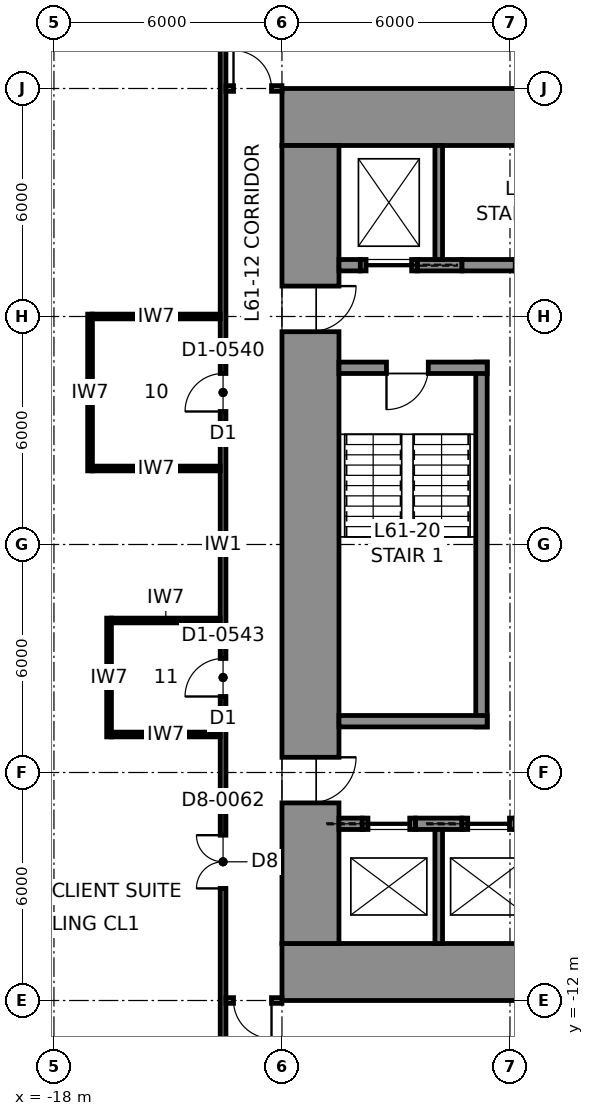
"""IFC4 building model, lengths in metres.
Left out: names, types, materials, properties, quantities, classifications, styles, units other than length and angle.
Written with IfcOpenShell. Run it as: python <this file> out.ifc"""

import sys

from ifc_helpers import new_model, si_unit, direction, frame, frame_2d, origin, place, context, subcontext, project, spatial, rectangle, extrude, element, fill, save


model = new_model("IFC4")
c1 = context("Model", 3, precision=1e-05, world=origin(), true_north=direction((0.0, 1.0)))
c2 = subcontext(c1, "Body", "Model", "MODEL_VIEW")
j1 = project(units=[si_unit("LENGTHUNIT", "METRE"), si_unit("PLANEANGLEUNIT", "RADIAN")], contexts=[c1])
p1 = place(None, origin())
s1 = spatial("IfcSite", under=j1, at=p1, CompositionType="ELEMENT")
p2 = place(p1, origin())
s2 = spatial("IfcBuilding", under=s1, at=p2, CompositionType="ELEMENT")
p3 = place(p2, frame((0.0, 0.0, 273.8)))
s3 = spatial("IfcBuildingStorey", under=s2, at=p3, CompositionType="ELEMENT", Elevation=273.8)
for number, where, z_axis, x_axis in (
    (1, (-12.0, 11.25, 0.0), (0.0, 0.0, 1.0), (1.0, 0.0, 0.0)),
    (2, (12.0, -11.25, 0.0), (0.0, 0.0, 1.0), (-1.0, 0.0, 0.0)),
):
    element("IfcWall", number, at=place(p3, frame(where, z_axis=z_axis, x_axis=x_axis)), inside=s3, PredefinedType="SHEAR", context=c2, shape_type="SweptSolid", body=[
        extrude(rectangle(XDim=24.0, YDim=1.5, at=frame_2d((12.0, 0.0))), origin(), (0.0, 0.0, 1.0), 4.0),
    ])
p4 = place(p3, frame((-11.25, -10.5, 0.0), z_axis=(0.0, 0.0, 1.0), x_axis=(0.0, 1.0, 0.0)))
e3 = element("IfcWall", 3, at=p4, inside=s3, PredefinedType="SHEAR", context=c2, shape_type="SweptSolid", body=[
    extrude(rectangle(XDim=21.0, YDim=1.5, at=frame_2d((10.5, 0.0))), origin(), (0.0, 0.0, 1.0), 4.0),
])
p5 = place(p4, frame((16.1, 0.0, 0.0)))
e4 = element("IfcOpeningElement", 4, at=p5, cuts=e3, PredefinedType="OPENING", context=c2, shape_type="SweptSolid", body=[
    extrude(rectangle(XDim=1.2, YDim=2.3, at=frame_2d((0.6, 1.15))), frame((0.0, 0.76, 0.0), z_axis=(0.0, -1.0, 0.0), x_axis=(1.0, 0.0, 0.0)), (0.0, 0.0, 1.0), 1.52),
])
p6 = place(p4, frame((3.7, 0.0, 0.0)))
e5 = element("IfcOpeningElement", 5, at=p6, cuts=e3, PredefinedType="OPENING", context=c2, shape_type="SweptSolid", body=[
    extrude(rectangle(XDim=1.2, YDim=2.3, at=frame_2d((0.6, 1.15))), frame((0.0, 0.76, 0.0), z_axis=(0.0, -1.0, 0.0), x_axis=(1.0, 0.0, 0.0)), (0.0, 0.0, 1.0), 1.52),
])
p7 = place(p3, frame((-10.5, 7.35, 0.0), z_axis=(0.0, 0.0, 1.0), x_axis=(1.0, 0.0, 0.0)))
e6 = element("IfcWall", 6, at=p7, inside=s3, PredefinedType="SHEAR", context=c2, shape_type="SweptSolid", body=[
    extrude(rectangle(XDim=0.562, YDim=0.3, at=frame_2d((0.281, 0.0))), origin(), (0.0, 0.0, 1.0), 4.0),
])
p8 = place(p3, frame((-8.438, 7.35, 0.0), z_axis=(0.0, 0.0, 1.0), x_axis=(1.0, 0.0, 0.0)))
e7 = element("IfcWall", 7, at=p8, inside=s3, PredefinedType="SHEAR", context=c2, shape_type="SweptSolid", body=[
    extrude(rectangle(XDim=1.175, YDim=0.3, at=frame_2d((0.587, 0.0))), origin(), (0.0, 0.0, 1.0), 4.0),
])
p9 = place(p3, frame((-9.938, 7.35, 0.0), z_axis=(0.0, 0.0, 1.0), x_axis=(1.0, 0.0, 0.0)))
e8 = element("IfcWall", 8, at=p9, inside=s3, PredefinedType="PARTITIONING", context=c2, shape_type="SweptSolid", body=[
    extrude(rectangle(XDim=1.5, YDim=0.3, at=frame_2d((0.75, 0.0))), origin(), (0.0, 0.0, 1.0), 4.0),
])
p10 = place(p9, frame((0.15, 0.0, 0.0)))
e9 = element("IfcOpeningElement", 9, at=p10, cuts=e8, PredefinedType="OPENING", context=c2, shape_type="SweptSolid", body=[
    extrude(rectangle(XDim=1.2, YDim=2.3, at=frame_2d((0.6, 1.15))), frame((0.0, 0.16, 0.0), z_axis=(0.0, -1.0, 0.0), x_axis=(1.0, 0.0, 0.0)), (0.0, 0.0, 1.0), 0.32),
])
p11 = place(p3, frame((-7.262, 7.35, 0.0), z_axis=(0.0, 0.0, 1.0), x_axis=(1.0, 0.0, 0.0)))
e10 = element("IfcWall", 10, at=p11, inside=s3, PredefinedType="PARTITIONING", context=c2, shape_type="SweptSolid", body=[
    extrude(rectangle(XDim=1.4, YDim=0.3, at=frame_2d((0.7, 0.0))), origin(), (0.0, 0.0, 1.0), 4.0),
])
p12 = place(p3, frame((-7.875, 7.5, 0.0), z_axis=(0.0, 0.0, 1.0), x_axis=(0.0, 1.0, 0.0)))
e11 = element("IfcWall", 11, at=p12, inside=s3, PredefinedType="PARTITIONING", context=c2, shape_type="SweptSolid", body=[
    extrude(rectangle(XDim=3.0, YDim=0.2, at=frame_2d((1.5, 0.0))), origin(), (0.0, 0.0, 1.0), 4.0),
])
p13 = place(p3, frame((-10.5, -7.35, 0.0), z_axis=(0.0, 0.0, 1.0), x_axis=(1.0, 0.0, 0.0)))
e12 = element("IfcWall", 12, at=p13, inside=s3, PredefinedType="SHEAR", context=c2, shape_type="SweptSolid", body=[
    extrude(rectangle(XDim=0.613, YDim=0.3, at=frame_2d((0.306, 0.0))), origin(), (0.0, 0.0, 1.0), 4.0),
])
p14 = place(p3, frame((-8.488, -7.35, 0.0), z_axis=(0.0, 0.0, 1.0), x_axis=(1.0, 0.0, 0.0)))
e13 = element("IfcWall", 13, at=p14, inside=s3, PredefinedType="SHEAR", context=c2, shape_type="SweptSolid", body=[
    extrude(rectangle(XDim=1.225, YDim=0.3, at=frame_2d((0.613, 0.0))), origin(), (0.0, 0.0, 1.0), 4.0),
])
p15 = place(p3, frame((-9.887, -7.35, 0.0), z_axis=(0.0, 0.0, 1.0), x_axis=(1.0, 0.0, 0.0)))
e14 = element("IfcWall", 14, at=p15, inside=s3, PredefinedType="PARTITIONING", context=c2, shape_type="SweptSolid", body=[
    extrude(rectangle(XDim=1.4, YDim=0.3, at=frame_2d((0.7, 0.0))), origin(), (0.0, 0.0, 1.0), 4.0),
])
p16 = place(p15, frame((0.15, 0.0, 0.0)))
e15 = element("IfcOpeningElement", 15, at=p16, cuts=e14, PredefinedType="OPENING", context=c2, shape_type="SweptSolid", body=[
    extrude(rectangle(XDim=1.1, YDim=2.3, at=frame_2d((0.55, 1.15))), frame((0.0, 0.16, 0.0), z_axis=(0.0, -1.0, 0.0), x_axis=(1.0, 0.0, 0.0)), (0.0, 0.0, 1.0), 0.32),
])
p17 = place(p3, frame((-7.262, -7.35, 0.0), z_axis=(0.0, 0.0, 1.0), x_axis=(1.0, 0.0, 0.0)))
e16 = element("IfcWall", 16, at=p17, inside=s3, PredefinedType="PARTITIONING", context=c2, shape_type="SweptSolid", body=[
    extrude(rectangle(XDim=1.4, YDim=0.3, at=frame_2d((0.7, 0.0))), origin(), (0.0, 0.0, 1.0), 4.0),
])
p18 = place(p17, frame((0.15, 0.0, 0.0)))
e17 = element("IfcOpeningElement", 17, at=p18, cuts=e16, PredefinedType="OPENING", context=c2, shape_type="SweptSolid", body=[
    extrude(rectangle(XDim=1.1, YDim=2.3, at=frame_2d((0.55, 1.15))), frame((0.0, 0.16, 0.0), z_axis=(0.0, -1.0, 0.0), x_axis=(1.0, 0.0, 0.0)), (0.0, 0.0, 1.0), 0.32),
])
p19 = place(p3, frame((-7.875, -10.5, 0.0), z_axis=(0.0, 0.0, 1.0), x_axis=(0.0, 1.0, 0.0)))
e18 = element("IfcWall", 18, at=p19, inside=s3, PredefinedType="PARTITIONING", context=c2, shape_type="SweptSolid", body=[
    extrude(rectangle(XDim=3.0, YDim=0.2, at=frame_2d((1.5, 0.0))), origin(), (0.0, 0.0, 1.0), 4.0),
])
p20 = place(p3, frame((-13.55, 13.575, 0.0), z_axis=(0.0, 0.0, 1.0), x_axis=(0.0, -1.0, 0.0)))
e19 = element("IfcWall", 19, at=p20, inside=s3, PredefinedType="PARTITIONING", context=c2, shape_type="SweptSolid", body=[
    extrude(rectangle(XDim=27.15, YDim=0.15, at=frame_2d((13.575, 0.0))), origin(), (0.0, 0.0, 1.0), 3.83),
])
p21 = place(p20, frame((21.225, 0.0, 0.0)))
e20 = element("IfcOpeningElement", 20, at=p21, cuts=e19, PredefinedType="OPENING", context=c2, shape_type="SweptSolid", body=[
    extrude(rectangle(XDim=1.4, YDim=2.3, at=frame_2d((0.7, 1.15))), frame((0.0, 0.085, 0.0), z_axis=(0.0, -1.0, 0.0), x_axis=(1.0, 0.0, 0.0)), (0.0, 0.0, 1.0), 0.17),
])
p22 = place(p20, frame((9.075, 0.0, 0.0)))
e21 = element("IfcOpeningElement", 21, at=p22, cuts=e19, PredefinedType="OPENING", context=c2, shape_type="SweptSolid", body=[
    extrude(rectangle(XDim=1.0, YDim=2.3, at=frame_2d((0.5, 1.15))), frame((0.0, 0.085, 0.0), z_axis=(0.0, -1.0, 0.0), x_axis=(1.0, 0.0, 0.0)), (0.0, 0.0, 1.0), 0.17),
])
p23 = place(p20, frame((16.575, 0.0, 0.0)))
e22 = element("IfcOpeningElement", 22, at=p23, cuts=e19, PredefinedType="OPENING", context=c2, shape_type="SweptSolid", body=[
    extrude(rectangle(XDim=1.0, YDim=2.3, at=frame_2d((0.5, 1.15))), frame((0.0, 0.085, 0.0), z_axis=(0.0, -1.0, 0.0), x_axis=(1.0, 0.0, 0.0)), (0.0, 0.0, 1.0), 0.17),
])
p24 = place(p3, frame((-13.475, 12.0, 0.0), z_axis=(0.0, 0.0, 1.0), x_axis=(1.0, 0.0, 0.0)))
e23 = element("IfcWall", 23, at=p24, inside=s3, PredefinedType="PARTITIONING", context=c2, shape_type="SweptSolid", body=[
    extrude(rectangle(XDim=1.475, YDim=0.15, at=frame_2d((0.738, 0.0))), origin(), (0.0, 0.0, 1.0), 3.83),
])
p25 = place(p24, frame((0.2, 0.0, 0.0)))
e24 = element("IfcOpeningElement", 24, at=p25, cuts=e23, PredefinedType="OPENING", context=c2, shape_type="SweptSolid", body=[
    extrude(rectangle(XDim=1.0, YDim=2.3, at=frame_2d((0.5, 1.15))), frame((0.0, 0.085, 0.0), z_axis=(0.0, -1.0, 0.0), x_axis=(1.0, 0.0, 0.0)), (0.0, 0.0, 1.0), 0.17),
])
p26 = place(p3, frame((-12.0, -12.0, 0.0), z_axis=(0.0, 0.0, 1.0), x_axis=(-1.0, 0.0, 0.0)))
e25 = element("IfcWall", 25, at=p26, inside=s3, PredefinedType="PARTITIONING", context=c2, shape_type="SweptSolid", body=[
    extrude(rectangle(XDim=1.475, YDim=0.15, at=frame_2d((0.738, 0.0))), origin(), (0.0, 0.0, 1.0), 3.83),
])
p27 = place(p26, frame((0.275, 0.0, 0.0)))
e26 = element("IfcOpeningElement", 26, at=p27, cuts=e25, PredefinedType="OPENING", context=c2, shape_type="SweptSolid", body=[
    extrude(rectangle(XDim=1.0, YDim=2.3, at=frame_2d((0.5, 1.15))), frame((0.0, 0.085, 0.0), z_axis=(0.0, -1.0, 0.0), x_axis=(1.0, 0.0, 0.0)), (0.0, 0.0, 1.0), 0.17),
])
p28 = place(p3, frame((-17.05, 1.938, 0.0), z_axis=(0.0, 0.0, 1.0), x_axis=(0.0, 1.0, 0.0)))
e27 = element("IfcWall", 27, at=p28, inside=s3, PredefinedType="PARTITIONING", context=c2, shape_type="SweptSolid", body=[
    extrude(rectangle(XDim=4.125, YDim=0.125, at=frame_2d((2.062, 0.0))), origin(), (0.0, 0.0, 1.0), 3.83),
])
for number, where, z_axis, x_axis in (
    (28, (-13.625, 2.0, 0.0), (0.0, 0.0, 1.0), (-1.0, 0.0, 0.0)),
    (29, (-13.625, 6.0, 0.0), (0.0, 0.0, 1.0), (-1.0, 0.0, 0.0)),
):
    element("IfcWall", number, at=place(p3, frame(where, z_axis=z_axis, x_axis=x_axis)), inside=s3, PredefinedType="PARTITIONING", context=c2, shape_type="SweptSolid", body=[
        extrude(rectangle(XDim=3.363, YDim=0.125, at=frame_2d((1.681, 0.0))), origin(), (0.0, 0.0, 1.0), 3.83),
    ])
p29 = place(p3, frame((-16.55, -5.062, 0.0), z_axis=(0.0, 0.0, 1.0), x_axis=(0.0, 1.0, 0.0)))
e30 = element("IfcWall", 30, at=p29, inside=s3, PredefinedType="PARTITIONING", context=c2, shape_type="SweptSolid", body=[
    extrude(rectangle(XDim=3.125, YDim=0.125, at=frame_2d((1.562, 0.0))), origin(), (0.0, 0.0, 1.0), 3.83),
])
for number, where, z_axis, x_axis in (
    (31, (-13.625, -5.0, 0.0), (0.0, 0.0, 1.0), (-1.0, 0.0, 0.0)),
    (32, (-13.625, -2.0, 0.0), (0.0, 0.0, 1.0), (-1.0, 0.0, 0.0)),
):
    element("IfcWall", number, at=place(p3, frame(where, z_axis=z_axis, x_axis=x_axis)), inside=s3, PredefinedType="PARTITIONING", context=c2, shape_type="SweptSolid", body=[
        extrude(rectangle(XDim=2.863, YDim=0.125, at=frame_2d((1.431, 0.0))), origin(), (0.0, 0.0, 1.0), 3.83),
    ])
p30 = place(p3, frame((-6.75, -4.8, 0.0), z_axis=(0.0, 0.0, 1.0), x_axis=(0.0, 1.0, 0.0)))
e33 = element("IfcWall", 33, at=p30, inside=s3, PredefinedType="SOLIDWALL", context=c2, shape_type="SweptSolid", body=[
    extrude(rectangle(XDim=9.6, YDim=0.3, at=frame_2d((4.8, 0.0))), origin(), (0.0, 0.0, 1.0), 3.75),
])
p31 = place(p3, frame((-10.5, 4.65, 0.0), z_axis=(0.0, 0.0, 1.0), x_axis=(1.0, 0.0, 0.0)))
e34 = element("IfcWall", 34, at=p31, inside=s3, PredefinedType="SOLIDWALL", context=c2, shape_type="SweptSolid", body=[
    extrude(rectangle(XDim=3.9, YDim=0.3, at=frame_2d((1.95, 0.0))), origin(), (0.0, 0.0, 1.0), 3.75),
])
p32 = place(p31, frame((1.25, 0.0, 0.0)))
e35 = element("IfcOpeningElement", 35, at=p32, cuts=e34, PredefinedType="OPENING", context=c2, shape_type="SweptSolid", body=[
    extrude(rectangle(XDim=1.1, YDim=2.3, at=frame_2d((0.55, 1.15))), frame((0.0, 0.16, 0.0), z_axis=(0.0, -1.0, 0.0), x_axis=(1.0, 0.0, 0.0)), (0.0, 0.0, 1.0), 0.32),
])
p33 = place(p3, frame((-6.6, -4.65, 0.0), z_axis=(0.0, 0.0, 1.0), x_axis=(-1.0, 0.0, 0.0)))
e36 = element("IfcWall", 36, at=p33, inside=s3, PredefinedType="SOLIDWALL", context=c2, shape_type="SweptSolid", body=[
    extrude(rectangle(XDim=3.9, YDim=0.3, at=frame_2d((1.95, 0.0))), origin(), (0.0, 0.0, 1.0), 3.75),
])
p34 = place(p25, origin())
e37 = element("IfcDoor", 37, at=p34, inside=s3, OperationType="SINGLE_SWING_LEFT", PredefinedType="DOOR", context=c2, shape_type="SweptSolid", body=[
    extrude(rectangle(XDim=1.0, YDim=2.3, at=frame_2d((0.5, 1.15))), frame((0.0, 0.025, 0.0), z_axis=(0.0, -1.0, 0.0), x_axis=(1.0, 0.0, 0.0)), (0.0, 0.0, 1.0), 0.05),
])
fill(e24, e37)
p35 = place(p27, origin())
e38 = element("IfcDoor", 38, at=p35, inside=s3, OperationType="SINGLE_SWING_LEFT", PredefinedType="DOOR", context=c2, shape_type="SweptSolid", body=[
    extrude(rectangle(XDim=1.0, YDim=2.3, at=frame_2d((0.5, 1.15))), frame((0.0, 0.025, 0.0), z_axis=(0.0, -1.0, 0.0), x_axis=(1.0, 0.0, 0.0)), (0.0, 0.0, 1.0), 0.05),
])
fill(e26, e38)
p36 = place(p21, frame((1.4, 0.0, 0.0), z_axis=(0.0, 0.0, 1.0), x_axis=(-1.0, 0.0, 0.0)))
e39 = element("IfcDoor", 39, at=p36, inside=s3, OperationType="DOUBLE_DOOR_SINGLE_SWING", PredefinedType="DOOR", context=c2, shape_type="SweptSolid", body=[
    extrude(rectangle(XDim=1.4, YDim=2.3, at=frame_2d((0.7, 1.15))), frame((0.0, 0.025, 0.0), z_axis=(0.0, -1.0, 0.0), x_axis=(1.0, 0.0, 0.0)), (0.0, 0.0, 1.0), 0.05),
])
fill(e20, e39)
p37 = place(p22, frame((1.0, 0.0, 0.0), z_axis=(0.0, 0.0, 1.0), x_axis=(-1.0, 0.0, 0.0)))
e40 = element("IfcDoor", 40, at=p37, inside=s3, OperationType="SINGLE_SWING_LEFT", PredefinedType="DOOR", context=c2, shape_type="SweptSolid", body=[
    extrude(rectangle(XDim=1.0, YDim=2.3, at=frame_2d((0.5, 1.15))), frame((0.0, 0.025, 0.0), z_axis=(0.0, -1.0, 0.0), x_axis=(1.0, 0.0, 0.0)), (0.0, 0.0, 1.0), 0.05),
])
fill(e21, e40)
p38 = place(p23, frame((1.0, 0.0, 0.0), z_axis=(0.0, 0.0, 1.0), x_axis=(-1.0, 0.0, 0.0)))
e41 = element("IfcDoor", 41, at=p38, inside=s3, OperationType="SINGLE_SWING_LEFT", PredefinedType="DOOR", context=c2, shape_type="SweptSolid", body=[
    extrude(rectangle(XDim=1.0, YDim=2.3, at=frame_2d((0.5, 1.15))), frame((0.0, 0.025, 0.0), z_axis=(0.0, -1.0, 0.0), x_axis=(1.0, 0.0, 0.0)), (0.0, 0.0, 1.0), 0.05),
])
fill(e22, e41)
p39 = place(p32, frame((1.1, 0.0, 0.0), z_axis=(0.0, 0.0, 1.0), x_axis=(-1.0, 0.0, 0.0)))
e42 = element("IfcDoor", 42, at=p39, inside=s3, OperationType="SINGLE_SWING_RIGHT", PredefinedType="DOOR", context=c2, shape_type="SweptSolid", body=[
    extrude(rectangle(XDim=1.1, YDim=2.3, at=frame_2d((0.55, 1.15))), frame((0.0, 0.025, 0.0), z_axis=(0.0, -1.0, 0.0), x_axis=(1.0, 0.0, 0.0)), (0.0, 0.0, 1.0), 0.05),
])
fill(e35, e42)
p40 = place(p5, frame((1.2, 0.0, 0.0), z_axis=(0.0, 0.0, 1.0), x_axis=(-1.0, 0.0, 0.0)))
e43 = element("IfcDoor", 43, at=p40, inside=s3, OperationType="SINGLE_SWING_LEFT", PredefinedType="DOOR", context=c2, shape_type="SweptSolid", body=[
    extrude(rectangle(XDim=1.2, YDim=2.3, at=frame_2d((0.6, 1.15))), frame((0.0, 0.025, 0.0), z_axis=(0.0, -1.0, 0.0), x_axis=(1.0, 0.0, 0.0)), (0.0, 0.0, 1.0), 0.05),
])
fill(e4, e43)
p41 = place(p6, frame((1.2, 0.0, 0.0), z_axis=(0.0, 0.0, 1.0), x_axis=(-1.0, 0.0, 0.0)))
e44 = element("IfcDoor", 44, at=p41, inside=s3, OperationType="SINGLE_SWING_LEFT", PredefinedType="DOOR", context=c2, shape_type="SweptSolid", body=[
    extrude(rectangle(XDim=1.2, YDim=2.3, at=frame_2d((0.6, 1.15))), frame((0.0, 0.025, 0.0), z_axis=(0.0, -1.0, 0.0), x_axis=(1.0, 0.0, 0.0)), (0.0, 0.0, 1.0), 0.05),
])
fill(e5, e44)
p42 = place(p10, frame((1.2, 0.0, 0.0), z_axis=(0.0, 0.0, 1.0), x_axis=(-1.0, 0.0, 0.0)))
e45 = element("IfcDoor", 45, at=p42, inside=s3, OperationType="SLIDING_TO_LEFT", PredefinedType="DOOR", context=c2, shape_type="SweptSolid", body=[
    extrude(rectangle(XDim=1.2, YDim=2.3, at=frame_2d((0.6, 1.15))), frame((0.0, 0.025, 0.0), z_axis=(0.0, -1.0, 0.0), x_axis=(1.0, 0.0, 0.0)), (0.0, 0.0, 1.0), 0.05),
])
fill(e9, e45)
p43 = place(p18, origin())
e46 = element("IfcDoor", 46, at=p43, inside=s3, OperationType="SLIDING_TO_LEFT", PredefinedType="DOOR", context=c2, shape_type="SweptSolid", body=[
    extrude(rectangle(XDim=1.1, YDim=2.3, at=frame_2d((0.55, 1.15))), frame((0.0, 0.025, 0.0), z_axis=(0.0, -1.0, 0.0), x_axis=(1.0, 0.0, 0.0)), (0.0, 0.0, 1.0), 0.05),
])
fill(e17, e46)
p44 = place(p16, origin())
e47 = element("IfcDoor", 47, at=p44, inside=s3, OperationType="SLIDING_TO_LEFT", PredefinedType="DOOR", context=c2, shape_type="SweptSolid", body=[
    extrude(rectangle(XDim=1.1, YDim=2.3, at=frame_2d((0.55, 1.15))), frame((0.0, 0.025, 0.0), z_axis=(0.0, -1.0, 0.0), x_axis=(1.0, 0.0, 0.0)), (0.0, 0.0, 1.0), 0.05),
])
fill(e15, e47)
save(model, sys.argv[1])
